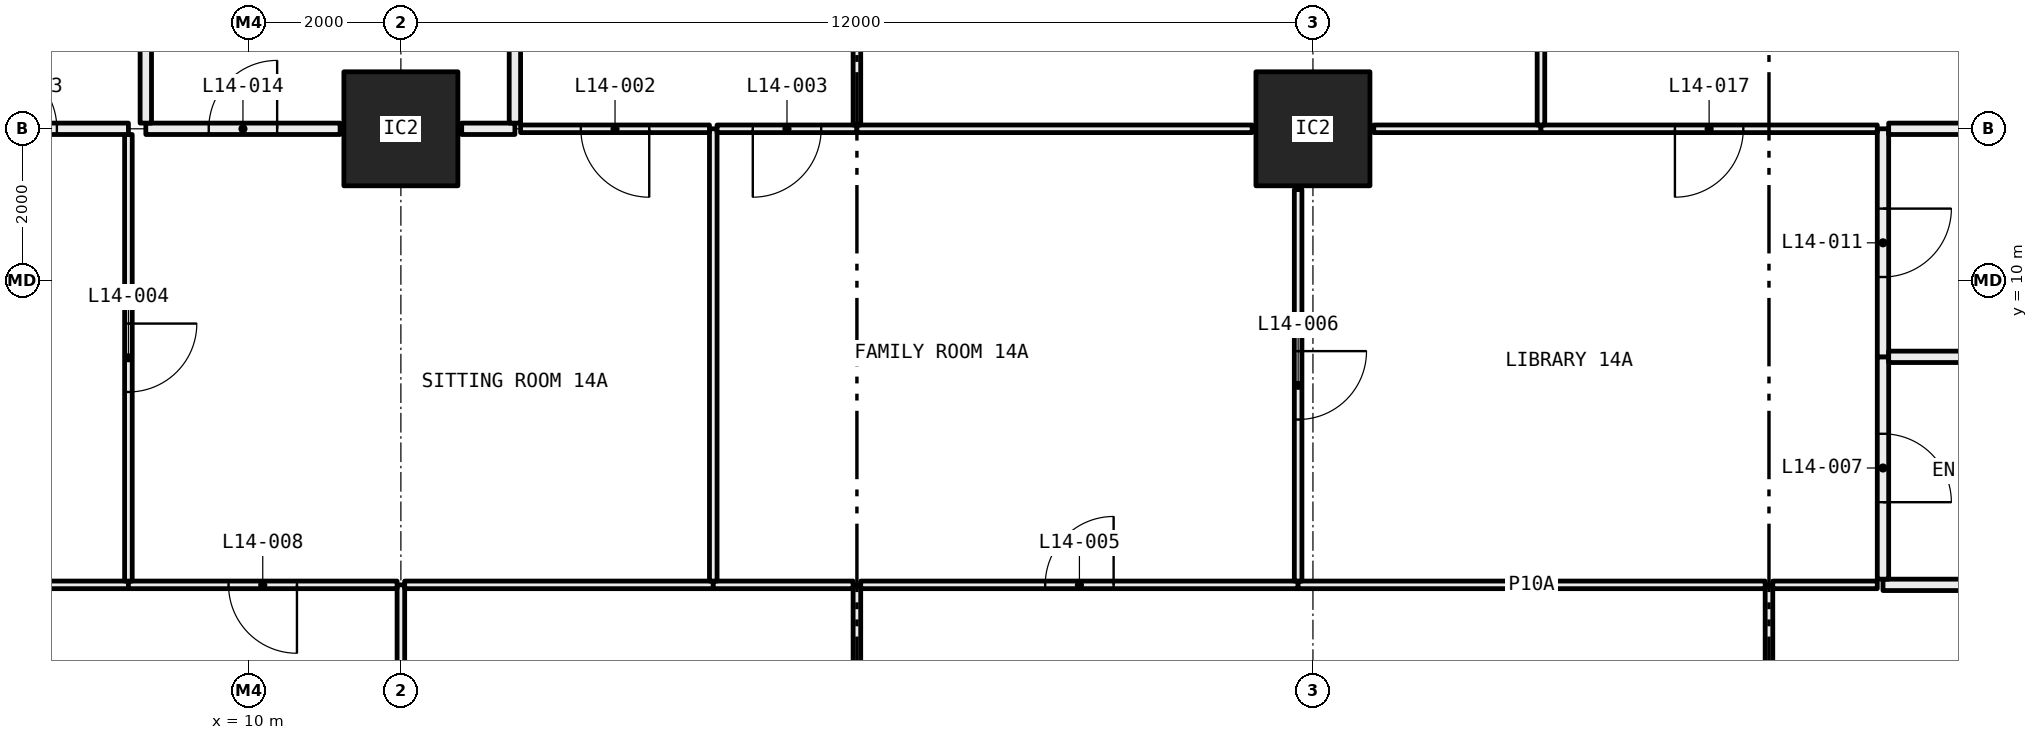
"""IFC4 building model, lengths in metres.
Left out: names, types, materials, properties, quantities, classifications, styles, units other than length and angle.
Written with IfcOpenShell. Run it as: python <this file> out.ifc"""

import sys

from ifc_helpers import new_model, si_unit, direction, frame, frame_2d, origin, origin_2d, place, context, subcontext, project, spatial, rectangle, hollow_rectangle, extrude, element, fill, save


model = new_model("IFC4")
c1 = context("Model", 3, precision=1e-05, world=origin(), true_north=direction((0.0, 1.0)))
c2 = subcontext(c1, "Body", "Model", "MODEL_VIEW")
j1 = project(units=[si_unit("LENGTHUNIT", "METRE"), si_unit("PLANEANGLEUNIT", "RADIAN")], contexts=[c1])
p1 = place(None, origin())
s1 = spatial("IfcSite", under=j1, at=p1, CompositionType="ELEMENT")
p2 = place(p1, origin())
s2 = spatial("IfcBuilding", under=s1, at=p2, CompositionType="ELEMENT")
p3 = place(p2, frame((0.0, 0.0, 61.05)))
s3 = spatial("IfcBuildingStorey", under=s2, at=p3, CompositionType="ELEMENT", Elevation=61.05)
for number, where, z_axis, x_axis in (
    (1, (12.0, 12.0, 0.0), (0.0, 0.0, 1.0), (1.0, 0.0, 0.0)),
    (2, (24.0, 12.0, 0.0), (0.0, 0.0, 1.0), (1.0, 0.0, 0.0)),
):
    element("IfcColumn", number, at=place(p3, frame(where, z_axis=z_axis, x_axis=x_axis)), inside=s3, PredefinedType="COLUMN", context=c2, shape_type="SweptSolid", body=[
        extrude(hollow_rectangle(XDim=1.5, YDim=1.5, WallThickness=0.065, at=origin_2d()), origin(), (0.0, 0.0, 1.0), 3.05),
    ])
p4 = place(p3, frame((12.0, 0.72, 0.0), z_axis=(0.0, 0.0, 1.0), x_axis=(0.0, 1.0, 0.0)))
e3 = element("IfcWall", 3, at=p4, inside=s3, PredefinedType="PARTITIONING", context=c2, shape_type="SweptSolid", body=[
    extrude(rectangle(XDim=5.28, YDim=0.1, at=frame_2d((2.64, 0.0))), origin(), (0.0, 0.0, 1.0), 2.45),
])
p5 = place(p3, frame((8.415, 6.0, 0.0), z_axis=(0.0, 0.0, 1.0), x_axis=(-1.0, 0.0, 0.0)))
e4 = element("IfcWall", 4, at=p5, inside=s3, PredefinedType="PARTITIONING", context=c2, shape_type="SweptSolid", body=[
    extrude(rectangle(XDim=1.695, YDim=0.1, at=frame_2d((0.848, 0.0))), origin(), (0.0, 0.0, 1.0), 3.05),
])
p6 = place(p3, frame((11.95, 6.0, 0.0), z_axis=(0.0, 0.0, 1.0), x_axis=(-1.0, 0.0, 0.0)))
e5 = element("IfcWall", 5, at=p6, inside=s3, PredefinedType="PARTITIONING", context=c2, shape_type="SweptSolid", body=[
    extrude(rectangle(XDim=3.535, YDim=0.1, at=frame_2d((1.768, 0.0))), origin(), (0.0, 0.0, 1.0), 2.45),
])
p7 = place(p6, frame((1.317, 0.0, 0.0)))
e6 = element("IfcOpeningElement", 6, at=p7, cuts=e5, PredefinedType="OPENING", context=c2, shape_type="SweptSolid", body=[
    extrude(rectangle(XDim=0.9, YDim=2.1, at=frame_2d((0.45, 1.05))), frame((0.0, 0.06, 0.0), z_axis=(0.0, -1.0, 0.0), x_axis=(1.0, 0.0, 0.0)), (0.0, 0.0, 1.0), 0.12),
])
p8 = place(p3, frame((18.0, 0.72, 0.0), z_axis=(0.0, 0.0, 1.0), x_axis=(0.0, 1.0, 0.0)))
e7 = element("IfcWall", 7, at=p8, inside=s3, PredefinedType="PARTITIONING", context=c2, shape_type="SweptSolid", body=[
    extrude(rectangle(XDim=5.28, YDim=0.1, at=frame_2d((2.64, 0.0))), origin(), (0.0, 0.0, 1.0), 3.05),
])
p9 = place(p8, frame((2.19, 0.0, 0.0)))
e8 = element("IfcOpeningElement", 8, at=p9, cuts=e7, PredefinedType="OPENING", context=c2, shape_type="SweptSolid", body=[
    extrude(rectangle(XDim=0.9, YDim=2.1, at=frame_2d((0.45, 1.05))), frame((0.0, 0.06, 0.0), z_axis=(0.0, -1.0, 0.0), x_axis=(1.0, 0.0, 0.0)), (0.0, 0.0, 1.0), 0.12),
])
p10 = place(p3, frame((16.11, 6.0, 0.0), z_axis=(0.0, 0.0, 1.0), x_axis=(-1.0, 0.0, 0.0)))
e9 = element("IfcWall", 9, at=p10, inside=s3, PredefinedType="PARTITIONING", context=c2, shape_type="SweptSolid", body=[
    extrude(rectangle(XDim=4.06, YDim=0.1, at=frame_2d((2.03, 0.0))), origin(), (0.0, 0.0, 1.0), 2.45),
])
p11 = place(p3, frame((17.95, 6.0, 0.0), z_axis=(0.0, 0.0, 1.0), x_axis=(-1.0, 0.0, 0.0)))
e10 = element("IfcWall", 10, at=p11, inside=s3, PredefinedType="PARTITIONING", context=c2, shape_type="SweptSolid", body=[
    extrude(rectangle(XDim=1.84, YDim=0.1, at=frame_2d((0.92, 0.0))), origin(), (0.0, 0.0, 1.0), 3.05),
])
p12 = place(p3, frame((30.0, 0.72, 0.0), z_axis=(0.0, 0.0, 1.0), x_axis=(0.0, 1.0, 0.0)))
e11 = element("IfcWall", 11, at=p12, inside=s3, PredefinedType="PARTITIONING", context=c2, shape_type="SweptSolid", body=[
    extrude(rectangle(XDim=5.28, YDim=0.1, at=frame_2d((2.64, 0.0))), origin(), (0.0, 0.0, 1.0), 3.05),
])
p13 = place(p12, frame((2.19, 0.0, 0.0)))
e12 = element("IfcOpeningElement", 12, at=p13, cuts=e11, PredefinedType="OPENING", context=c2, shape_type="SweptSolid", body=[
    extrude(rectangle(XDim=0.9, YDim=2.1, at=frame_2d((0.45, 1.05))), frame((0.0, 0.06, 0.0), z_axis=(0.0, -1.0, 0.0), x_axis=(1.0, 0.0, 0.0)), (0.0, 0.0, 1.0), 0.12),
])
p14 = place(p3, frame((23.805, 6.0, 0.0), z_axis=(0.0, 0.0, 1.0), x_axis=(-1.0, 0.0, 0.0)))
e13 = element("IfcWall", 13, at=p14, inside=s3, PredefinedType="PARTITIONING", context=c2, shape_type="SweptSolid", body=[
    extrude(rectangle(XDim=5.755, YDim=0.1, at=frame_2d((2.877, 0.0))), origin(), (0.0, 0.0, 1.0), 3.05),
])
p15 = place(p14, frame((2.427, 0.0, 0.0)))
e14 = element("IfcOpeningElement", 14, at=p15, cuts=e13, PredefinedType="OPENING", context=c2, shape_type="SweptSolid", body=[
    extrude(rectangle(XDim=0.9, YDim=2.1, at=frame_2d((0.45, 1.05))), frame((0.0, 0.06, 0.0), z_axis=(0.0, -1.0, 0.0), x_axis=(1.0, 0.0, 0.0)), (0.0, 0.0, 1.0), 0.12),
])
p16 = place(p3, frame((29.95, 6.0, 0.0), z_axis=(0.0, 0.0, 1.0), x_axis=(-1.0, 0.0, 0.0)))
e15 = element("IfcWall", 15, at=p16, inside=s3, PredefinedType="PARTITIONING", context=c2, shape_type="SweptSolid", body=[
    extrude(rectangle(XDim=6.145, YDim=0.1, at=frame_2d((3.073, 0.0))), origin(), (0.0, 0.0, 1.0), 2.45),
])
p17 = place(p3, frame((31.425, 6.0, 0.0), z_axis=(0.0, 0.0, 1.0), x_axis=(-1.0, 0.0, 0.0)))
e16 = element("IfcWall", 16, at=p17, inside=s3, PredefinedType="PARTITIONING", context=c2, shape_type="SweptSolid", body=[
    extrude(rectangle(XDim=1.375, YDim=0.1, at=frame_2d((0.688, 0.0))), origin(), (0.0, 0.0, 1.0), 3.05),
])
p18 = place(p3, frame((35.9, 6.0, 0.0), z_axis=(0.0, 0.0, 1.0), x_axis=(-1.0, 0.0, 0.0)))
e17 = element("IfcWall", 17, at=p18, inside=s3, PredefinedType="PARTITIONING", context=c2, shape_type="SweptSolid", body=[
    extrude(rectangle(XDim=4.4, YDim=0.15, at=frame_2d((2.2, 0.0))), origin(), (0.0, 0.0, 1.0), 3.05),
])
p19 = place(p3, frame((8.415, 6.05, 0.0), z_axis=(0.0, 0.0, 1.0), x_axis=(0.0, 1.0, 0.0)))
e18 = element("IfcWall", 18, at=p19, inside=s3, PredefinedType="PARTITIONING", context=c2, shape_type="SweptSolid", body=[
    extrude(rectangle(XDim=5.875, YDim=0.1, at=frame_2d((2.938, 0.0))), origin(), (0.0, 0.0, 1.0), 2.45),
])
p20 = place(p19, frame((2.488, 0.0, 0.0)))
e19 = element("IfcOpeningElement", 19, at=p20, cuts=e18, PredefinedType="OPENING", context=c2, shape_type="SweptSolid", body=[
    extrude(rectangle(XDim=0.9, YDim=2.1, at=frame_2d((0.45, 1.05))), frame((0.0, 0.06, 0.0), z_axis=(0.0, -1.0, 0.0), x_axis=(1.0, 0.0, 0.0)), (0.0, 0.0, 1.0), 0.12),
])
p21 = place(p3, frame((8.415, 12.0, 0.0), z_axis=(0.0, 0.0, 1.0), x_axis=(-1.0, 0.0, 0.0)))
e20 = element("IfcWall", 20, at=p21, inside=s3, PredefinedType="PARTITIONING", context=c2, shape_type="SweptSolid", body=[
    extrude(rectangle(XDim=2.782, YDim=0.15, at=frame_2d((1.391, 0.0))), origin(), (0.0, 0.0, 1.0), 2.45),
])
p22 = place(p21, frame((0.941, 0.0, 0.0)))
e21 = element("IfcOpeningElement", 21, at=p22, cuts=e20, PredefinedType="OPENING", context=c2, shape_type="SweptSolid", body=[
    extrude(rectangle(XDim=0.9, YDim=2.1, at=frame_2d((0.45, 1.05))), frame((0.0, 0.085, 0.0), z_axis=(0.0, -1.0, 0.0), x_axis=(1.0, 0.0, 0.0)), (0.0, 0.0, 1.0), 0.17),
])
p23 = place(p3, frame((16.11, 6.05, 0.0), z_axis=(0.0, 0.0, 1.0), x_axis=(0.0, 1.0, 0.0)))
e22 = element("IfcWall", 22, at=p23, inside=s3, PredefinedType="PARTITIONING", context=c2, shape_type="SweptSolid", body=[
    extrude(rectangle(XDim=5.95, YDim=0.1, at=frame_2d((2.975, 0.0))), origin(), (0.0, 0.0, 1.0), 2.45),
])
p24 = place(p3, frame((11.2, 12.0, 0.0), z_axis=(0.0, 0.0, 1.0), x_axis=(-1.0, 0.0, 0.0)))
e23 = element("IfcWall", 23, at=p24, inside=s3, PredefinedType="PARTITIONING", context=c2, shape_type="SweptSolid", body=[
    extrude(rectangle(XDim=2.556, YDim=0.15, at=frame_2d((1.278, 0.0))), origin(), (0.0, 0.0, 1.0), 2.45),
])
p25 = place(p24, frame((0.828, 0.0, 0.0)))
e24 = element("IfcOpeningElement", 24, at=p25, cuts=e23, PredefinedType="OPENING", context=c2, shape_type="SweptSolid", body=[
    extrude(rectangle(XDim=0.9, YDim=2.1, at=frame_2d((0.45, 1.05))), frame((0.0, 0.085, 0.0), z_axis=(0.0, -1.0, 0.0), x_axis=(1.0, 0.0, 0.0)), (0.0, 0.0, 1.0), 0.17),
])
p26 = place(p3, frame((13.5, 12.0, 0.0), z_axis=(0.0, 0.0, 1.0), x_axis=(-1.0, 0.0, 0.0)))
e25 = element("IfcWall", 25, at=p26, inside=s3, PredefinedType="PARTITIONING", context=c2, shape_type="SweptSolid", body=[
    extrude(rectangle(XDim=0.7, YDim=0.15, at=frame_2d((0.35, 0.0))), origin(), (0.0, 0.0, 1.0), 2.45),
])
p27 = place(p3, frame((16.06, 12.0, 0.0), z_axis=(0.0, 0.0, 1.0), x_axis=(-1.0, 0.0, 0.0)))
e26 = element("IfcWall", 26, at=p27, inside=s3, PredefinedType="PARTITIONING", context=c2, shape_type="SweptSolid", body=[
    extrude(rectangle(XDim=2.485, YDim=0.1, at=frame_2d((1.243, 0.0))), origin(), (0.0, 0.0, 1.0), 2.45),
])
p28 = place(p27, frame((0.792, 0.0, 0.0)))
e27 = element("IfcOpeningElement", 27, at=p28, cuts=e26, PredefinedType="OPENING", context=c2, shape_type="SweptSolid", body=[
    extrude(rectangle(XDim=0.9, YDim=2.1, at=frame_2d((0.45, 1.05))), frame((0.0, 0.06, 0.0), z_axis=(0.0, -1.0, 0.0), x_axis=(1.0, 0.0, 0.0)), (0.0, 0.0, 1.0), 0.12),
])
p29 = place(p3, frame((23.805, 6.05, 0.0), z_axis=(0.0, 0.0, 1.0), x_axis=(0.0, 1.0, 0.0)))
e28 = element("IfcWall", 28, at=p29, inside=s3, PredefinedType="PARTITIONING", context=c2, shape_type="SweptSolid", body=[
    extrude(rectangle(XDim=5.15, YDim=0.1, at=frame_2d((2.575, 0.0))), origin(), (0.0, 0.0, 1.0), 3.05),
])
p30 = place(p29, frame((2.125, 0.0, 0.0)))
e29 = element("IfcOpeningElement", 29, at=p30, cuts=e28, PredefinedType="OPENING", context=c2, shape_type="SweptSolid", body=[
    extrude(rectangle(XDim=0.9, YDim=2.1, at=frame_2d((0.45, 1.05))), frame((0.0, 0.06, 0.0), z_axis=(0.0, -1.0, 0.0), x_axis=(1.0, 0.0, 0.0)), (0.0, 0.0, 1.0), 0.12),
])
p31 = place(p3, frame((18.0, 12.0, 0.0), z_axis=(0.0, 0.0, 1.0), x_axis=(-1.0, 0.0, 0.0)))
e30 = element("IfcWall", 30, at=p31, inside=s3, PredefinedType="PARTITIONING", context=c2, shape_type="SweptSolid", body=[
    extrude(rectangle(XDim=1.84, YDim=0.1, at=frame_2d((0.92, 0.0))), origin(), (0.0, 0.0, 1.0), 2.45),
])
p32 = place(p31, frame((0.47, 0.0, 0.0)))
e31 = element("IfcOpeningElement", 31, at=p32, cuts=e30, PredefinedType="OPENING", context=c2, shape_type="SweptSolid", body=[
    extrude(rectangle(XDim=0.9, YDim=2.1, at=frame_2d((0.45, 1.05))), frame((0.0, 0.06, 0.0), z_axis=(0.0, -1.0, 0.0), x_axis=(1.0, 0.0, 0.0)), (0.0, 0.0, 1.0), 0.12),
])
p33 = place(p3, frame((23.2, 12.0, 0.0), z_axis=(0.0, 0.0, 1.0), x_axis=(-1.0, 0.0, 0.0)))
e32 = element("IfcWall", 32, at=p33, inside=s3, PredefinedType="PARTITIONING", context=c2, shape_type="SweptSolid", body=[
    extrude(rectangle(XDim=5.2, YDim=0.1, at=frame_2d((2.6, 0.0))), origin(), (0.0, 0.0, 1.0), 2.45),
])
p34 = place(p3, frame((31.5, 6.075, 0.0), z_axis=(0.0, 0.0, 1.0), x_axis=(0.0, 1.0, 0.0)))
e33 = element("IfcWall", 33, at=p34, inside=s3, PredefinedType="PARTITIONING", context=c2, shape_type="SweptSolid", body=[
    extrude(rectangle(XDim=2.925, YDim=0.15, at=frame_2d((1.462, 0.0))), origin(), (0.0, 0.0, 1.0), 3.05),
])
p35 = place(p34, frame((1.012, 0.0, 0.0)))
e34 = element("IfcOpeningElement", 34, at=p35, cuts=e33, PredefinedType="OPENING", context=c2, shape_type="SweptSolid", body=[
    extrude(rectangle(XDim=0.9, YDim=2.1, at=frame_2d((0.45, 1.05))), frame((0.0, 0.085, 0.0), z_axis=(0.0, -1.0, 0.0), x_axis=(1.0, 0.0, 0.0)), (0.0, 0.0, 1.0), 0.17),
])
p36 = place(p3, frame((31.5, 9.0, 0.0), z_axis=(0.0, 0.0, 1.0), x_axis=(0.0, 1.0, 0.0)))
e35 = element("IfcWall", 35, at=p36, inside=s3, PredefinedType="PARTITIONING", context=c2, shape_type="SweptSolid", body=[
    extrude(rectangle(XDim=3.0, YDim=0.15, at=frame_2d((1.5, 0.0))), origin(), (0.0, 0.0, 1.0), 2.45),
])
p37 = place(p36, frame((1.05, 0.0, 0.0)))
e36 = element("IfcOpeningElement", 36, at=p37, cuts=e35, PredefinedType="OPENING", context=c2, shape_type="SweptSolid", body=[
    extrude(rectangle(XDim=0.9, YDim=2.1, at=frame_2d((0.45, 1.05))), frame((0.0, 0.085, 0.0), z_axis=(0.0, -1.0, 0.0), x_axis=(1.0, 0.0, 0.0)), (0.0, 0.0, 1.0), 0.17),
])
p38 = place(p3, frame((27.0, 12.0, 0.0), z_axis=(0.0, 0.0, 1.0), x_axis=(-1.0, 0.0, 0.0)))
e37 = element("IfcWall", 37, at=p38, inside=s3, PredefinedType="PARTITIONING", context=c2, shape_type="SweptSolid", body=[
    extrude(rectangle(XDim=2.2, YDim=0.1, at=frame_2d((1.1, 0.0))), origin(), (0.0, 0.0, 1.0), 2.45),
])
p39 = place(p3, frame((31.425, 12.0, 0.0), z_axis=(0.0, 0.0, 1.0), x_axis=(-1.0, 0.0, 0.0)))
e38 = element("IfcWall", 38, at=p39, inside=s3, PredefinedType="PARTITIONING", context=c2, shape_type="SweptSolid", body=[
    extrude(rectangle(XDim=4.425, YDim=0.1, at=frame_2d((2.212, 0.0))), origin(), (0.0, 0.0, 1.0), 2.45),
])
p40 = place(p39, frame((1.762, 0.0, 0.0)))
e39 = element("IfcOpeningElement", 39, at=p40, cuts=e38, PredefinedType="OPENING", context=c2, shape_type="SweptSolid", body=[
    extrude(rectangle(XDim=0.9, YDim=2.1, at=frame_2d((0.45, 1.05))), frame((0.0, 0.06, 0.0), z_axis=(0.0, -1.0, 0.0), x_axis=(1.0, 0.0, 0.0)), (0.0, 0.0, 1.0), 0.12),
])
p41 = place(p3, frame((35.9, 9.0, 0.0), z_axis=(0.0, 0.0, 1.0), x_axis=(-1.0, 0.0, 0.0)))
e40 = element("IfcWall", 40, at=p41, inside=s3, PredefinedType="PARTITIONING", context=c2, shape_type="SweptSolid", body=[
    extrude(rectangle(XDim=4.325, YDim=0.15, at=frame_2d((2.163, 0.0))), origin(), (0.0, 0.0, 1.0), 3.05),
])
p42 = place(p3, frame((35.2, 12.0, 0.0), z_axis=(0.0, 0.0, 1.0), x_axis=(-1.0, 0.0, 0.0)))
e41 = element("IfcWall", 41, at=p42, inside=s3, PredefinedType="PARTITIONING", context=c2, shape_type="SweptSolid", body=[
    extrude(rectangle(XDim=3.625, YDim=0.15, at=frame_2d((1.812, 0.0))), origin(), (0.0, 0.0, 1.0), 2.45),
])
p43 = place(p3, frame((8.644, 12.075, 0.0), z_axis=(0.0, 0.0, 1.0), x_axis=(0.0, 1.0, 0.0)))
e42 = element("IfcWall", 42, at=p43, inside=s3, PredefinedType="PARTITIONING", context=c2, shape_type="SweptSolid", body=[
    extrude(rectangle(XDim=2.396, YDim=0.15, at=frame_2d((1.198, 0.0))), origin(), (0.0, 0.0, 1.0), 2.45),
])
p44 = place(p3, frame((13.5, 12.075, 0.0), z_axis=(0.0, 0.0, 1.0), x_axis=(0.0, 1.0, 0.0)))
e43 = element("IfcWall", 43, at=p44, inside=s3, PredefinedType="PARTITIONING", context=c2, shape_type="SweptSolid", body=[
    extrude(rectangle(XDim=2.321, YDim=0.15, at=frame_2d((1.161, 0.0))), origin(), (0.0, 0.0, 1.0), 2.45),
])
p45 = place(p3, frame((18.0, 12.05, 0.0), z_axis=(0.0, 0.0, 1.0), x_axis=(0.0, 1.0, 0.0)))
e44 = element("IfcWall", 44, at=p45, inside=s3, PredefinedType="PARTITIONING", context=c2, shape_type="SweptSolid", body=[
    extrude(rectangle(XDim=5.85, YDim=0.1, at=frame_2d((2.925, 0.0))), origin(), (0.0, 0.0, 1.0), 2.45),
])
p46 = place(p45, frame((2.475, 0.0, 0.0)))
e45 = element("IfcOpeningElement", 45, at=p46, cuts=e44, PredefinedType="OPENING", context=c2, shape_type="SweptSolid", body=[
    extrude(rectangle(XDim=0.9, YDim=2.1, at=frame_2d((0.45, 1.05))), frame((0.0, 0.06, 0.0), z_axis=(0.0, -1.0, 0.0), x_axis=(1.0, 0.0, 0.0)), (0.0, 0.0, 1.0), 0.12),
])
p47 = place(p3, frame((27.0, 12.05, 0.0), z_axis=(0.0, 0.0, 1.0), x_axis=(0.0, 1.0, 0.0)))
e46 = element("IfcWall", 46, at=p47, inside=s3, PredefinedType="PARTITIONING", context=c2, shape_type="SweptSolid", body=[
    extrude(rectangle(XDim=5.95, YDim=0.1, at=frame_2d((2.975, 0.0))), origin(), (0.0, 0.0, 1.0), 2.45),
])
p48 = place(p28, origin())
e47 = element("IfcDoor", 47, at=p48, inside=s3, OperationType="SINGLE_SWING_RIGHT", PredefinedType="DOOR", context=c2, shape_type="SweptSolid", body=[
    extrude(rectangle(XDim=0.9, YDim=2.1, at=frame_2d((0.45, 1.05))), frame((0.0, 0.025, 0.0), z_axis=(0.0, -1.0, 0.0), x_axis=(1.0, 0.0, 0.0)), (0.0, 0.0, 1.0), 0.05),
])
fill(e27, e47)
p49 = place(p32, origin())
e48 = element("IfcDoor", 48, at=p49, inside=s3, OperationType="SINGLE_SWING_LEFT", PredefinedType="DOOR", context=c2, shape_type="SweptSolid", body=[
    extrude(rectangle(XDim=0.9, YDim=2.1, at=frame_2d((0.45, 1.05))), frame((0.0, 0.025, 0.0), z_axis=(0.0, -1.0, 0.0), x_axis=(1.0, 0.0, 0.0)), (0.0, 0.0, 1.0), 0.05),
])
fill(e31, e48)
p50 = place(p20, frame((0.9, 0.0, 0.0), x_axis=(-1.0, 0.0, 0.0)))
e49 = element("IfcDoor", 49, at=p50, inside=s3, OperationType="SINGLE_SWING_RIGHT", PredefinedType="DOOR", context=c2, shape_type="SweptSolid", body=[
    extrude(rectangle(XDim=0.9, YDim=2.1, at=frame_2d((0.45, 1.05))), frame((0.0, 0.025, 0.0), z_axis=(0.0, -1.0, 0.0), x_axis=(1.0, 0.0, 0.0)), (0.0, 0.0, 1.0), 0.05),
])
fill(e19, e49)
p51 = place(p15, frame((0.9, 0.0, 0.0), x_axis=(-1.0, 0.0, 0.0)))
e50 = element("IfcDoor", 50, at=p51, inside=s3, OperationType="SINGLE_SWING_LEFT", PredefinedType="DOOR", context=c2, shape_type="SweptSolid", body=[
    extrude(rectangle(XDim=0.9, YDim=2.1, at=frame_2d((0.45, 1.05))), frame((0.0, 0.025, 0.0), z_axis=(0.0, -1.0, 0.0), x_axis=(1.0, 0.0, 0.0)), (0.0, 0.0, 1.0), 0.05),
])
fill(e14, e50)
p52 = place(p30, frame((0.9, 0.0, 0.0), x_axis=(-1.0, 0.0, 0.0)))
e51 = element("IfcDoor", 51, at=p52, inside=s3, OperationType="SINGLE_SWING_RIGHT", PredefinedType="DOOR", context=c2, shape_type="SweptSolid", body=[
    extrude(rectangle(XDim=0.9, YDim=2.1, at=frame_2d((0.45, 1.05))), frame((0.0, 0.025, 0.0), z_axis=(0.0, -1.0, 0.0), x_axis=(1.0, 0.0, 0.0)), (0.0, 0.0, 1.0), 0.05),
])
fill(e29, e51)
p53 = place(p35, frame((0.9, 0.0, 0.0), x_axis=(-1.0, 0.0, 0.0)))
e52 = element("IfcDoor", 52, at=p53, inside=s3, OperationType="SINGLE_SWING_LEFT", PredefinedType="DOOR", context=c2, shape_type="SweptSolid", body=[
    extrude(rectangle(XDim=0.9, YDim=2.1, at=frame_2d((0.45, 1.05))), frame((0.0, 0.025, 0.0), z_axis=(0.0, -1.0, 0.0), x_axis=(1.0, 0.0, 0.0)), (0.0, 0.0, 1.0), 0.05),
])
fill(e34, e52)
p54 = place(p7, origin())
e53 = element("IfcDoor", 53, at=p54, inside=s3, OperationType="SINGLE_SWING_RIGHT", PredefinedType="DOOR", context=c2, shape_type="SweptSolid", body=[
    extrude(rectangle(XDim=0.9, YDim=2.1, at=frame_2d((0.45, 1.05))), frame((0.0, 0.025, 0.0), z_axis=(0.0, -1.0, 0.0), x_axis=(1.0, 0.0, 0.0)), (0.0, 0.0, 1.0), 0.05),
])
fill(e6, e53)
p55 = place(p37, frame((0.9, 0.0, 0.0), x_axis=(-1.0, 0.0, 0.0)))
e54 = element("IfcDoor", 54, at=p55, inside=s3, OperationType="SINGLE_SWING_RIGHT", PredefinedType="DOOR", context=c2, shape_type="SweptSolid", body=[
    extrude(rectangle(XDim=0.9, YDim=2.1, at=frame_2d((0.45, 1.05))), frame((0.0, 0.025, 0.0), z_axis=(0.0, -1.0, 0.0), x_axis=(1.0, 0.0, 0.0)), (0.0, 0.0, 1.0), 0.05),
])
fill(e36, e54)
p56 = place(p22, frame((0.9, 0.0, 0.0), x_axis=(-1.0, 0.0, 0.0)))
e55 = element("IfcDoor", 55, at=p56, inside=s3, OperationType="SINGLE_SWING_RIGHT", PredefinedType="DOOR", context=c2, shape_type="SweptSolid", body=[
    extrude(rectangle(XDim=0.9, YDim=2.1, at=frame_2d((0.45, 1.05))), frame((0.0, 0.025, 0.0), z_axis=(0.0, -1.0, 0.0), x_axis=(1.0, 0.0, 0.0)), (0.0, 0.0, 1.0), 0.05),
])
fill(e21, e55)
p57 = place(p25, frame((0.9, 0.0, 0.0), x_axis=(-1.0, 0.0, 0.0)))
e56 = element("IfcDoor", 56, at=p57, inside=s3, OperationType="SINGLE_SWING_LEFT", PredefinedType="DOOR", context=c2, shape_type="SweptSolid", body=[
    extrude(rectangle(XDim=0.9, YDim=2.1, at=frame_2d((0.45, 1.05))), frame((0.0, 0.025, 0.0), z_axis=(0.0, -1.0, 0.0), x_axis=(1.0, 0.0, 0.0)), (0.0, 0.0, 1.0), 0.05),
])
fill(e24, e56)
p58 = place(p40, origin())
e57 = element("IfcDoor", 57, at=p58, inside=s3, OperationType="SINGLE_SWING_LEFT", PredefinedType="DOOR", context=c2, shape_type="SweptSolid", body=[
    extrude(rectangle(XDim=0.9, YDim=2.1, at=frame_2d((0.45, 1.05))), frame((0.0, 0.025, 0.0), z_axis=(0.0, -1.0, 0.0), x_axis=(1.0, 0.0, 0.0)), (0.0, 0.0, 1.0), 0.05),
])
fill(e39, e57)
save(model, sys.argv[1])
